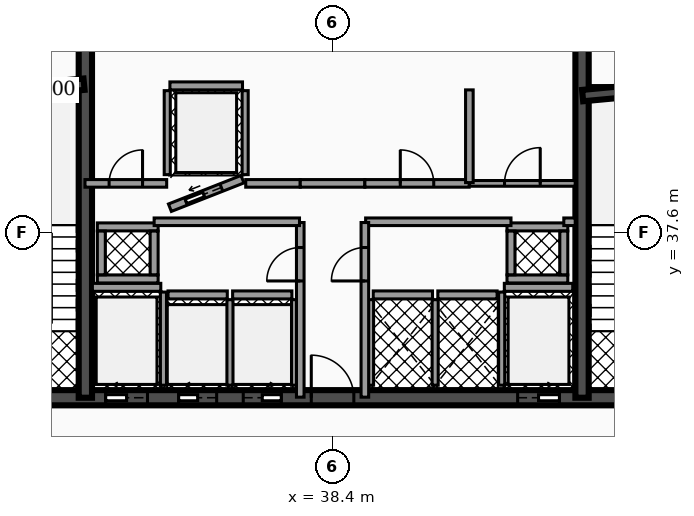
"""IFC4 building model, lengths in metres.
Left out: names, types, materials, properties, quantities, classifications, styles, units other than length and angle.
Written with IfcOpenShell. Run it as: python <this file> out.ifc"""

import sys

from ifc_helpers import new_model, si_unit, direction, frame, frame_2d, origin, place, context, subcontext, project, spatial, rectangle, extrude, element, fill, save


model = new_model("IFC4")
c1 = context("Model", 3, precision=1e-05, world=origin(), true_north=direction((0.0, 1.0)))
c2 = subcontext(c1, "Body", "Model", "MODEL_VIEW")
j1 = project(units=[si_unit("LENGTHUNIT", "METRE"), si_unit("PLANEANGLEUNIT", "RADIAN")], contexts=[c1])
p1 = place(None, origin())
s1 = spatial("IfcSite", under=j1, at=p1, CompositionType="ELEMENT")
p2 = place(p1, origin())
s2 = spatial("IfcBuilding", under=s1, at=p2, CompositionType="ELEMENT")
p3 = place(p2, frame((0.0, 0.0, 138.38)))
s3 = spatial("IfcBuildingStorey", under=s2, at=p3, CompositionType="ELEMENT", Elevation=138.38)
p4 = place(p3, frame((28.4, 33.25, 0.0), z_axis=(0.0, 0.0, 1.0), x_axis=(1.0, 0.0, 0.0)))
e1 = element("IfcWall", 1, at=p4, inside=s3, PredefinedType="SHEAR", context=c2, shape_type="SweptSolid", body=[
    extrude(rectangle(XDim=20.06, YDim=0.4, at=frame_2d((10.03, 0.0))), origin(), (0.0, 0.0, 1.0), 3.5),
])
p5 = place(p4, frame((4.03, 0.0, 0.0)))
e2 = element("IfcOpeningElement", 2, at=p5, cuts=e1, PredefinedType="OPENING", context=c2, shape_type="SweptSolid", body=[
    extrude(rectangle(XDim=1.1, YDim=2.15, at=frame_2d((0.55, 1.075))), frame((0.0, 0.21, 0.0), z_axis=(0.0, -1.0, 0.0), x_axis=(1.0, 0.0, 0.0)), (0.0, 0.0, 1.0), 0.42),
])
p6 = place(p4, frame((14.87, 0.0, 0.0)))
e3 = element("IfcOpeningElement", 3, at=p6, cuts=e1, PredefinedType="OPENING", context=c2, shape_type="SweptSolid", body=[
    extrude(rectangle(XDim=1.1, YDim=2.15, at=frame_2d((0.55, 1.075))), frame((0.0, 0.21, 0.0), z_axis=(0.0, -1.0, 0.0), x_axis=(1.0, 0.0, 0.0)), (0.0, 0.0, 1.0), 0.42),
])
p7 = place(p4, frame((5.95, 0.0, 0.0)))
e4 = element("IfcOpeningElement", 4, at=p7, cuts=e1, PredefinedType="OPENING", context=c2, shape_type="SweptSolid", body=[
    extrude(rectangle(XDim=1.0, YDim=2.1, at=frame_2d((0.5, 1.05))), frame((0.0, 0.21, 0.0), z_axis=(0.0, -1.0, 0.0), x_axis=(1.0, 0.0, 0.0)), (0.0, 0.0, 1.0), 0.42),
])
p8 = place(p4, frame((7.65, 0.0, 0.0)))
e5 = element("IfcOpeningElement", 5, at=p8, cuts=e1, PredefinedType="OPENING", context=c2, shape_type="SweptSolid", body=[
    extrude(rectangle(XDim=1.0, YDim=2.1, at=frame_2d((0.5, 1.05))), frame((0.0, 0.21, 0.0), z_axis=(0.0, -1.0, 0.0), x_axis=(1.0, 0.0, 0.0)), (0.0, 0.0, 1.0), 0.42),
])
p9 = place(p4, frame((1.31, 0.0, 0.0)))
e6 = element("IfcOpeningElement", 6, at=p9, cuts=e1, PredefinedType="OPENING", context=c2, shape_type="SweptSolid", body=[
    extrude(rectangle(XDim=1.1, YDim=2.2, at=frame_2d((0.55, 1.1))), frame((0.0, 0.21, 0.0), z_axis=(0.0, -1.0, 0.0), x_axis=(1.0, 0.0, 0.0)), (0.0, 0.0, 1.0), 0.42),
])
p10 = place(p4, frame((9.44, 0.0, 0.0)))
e7 = element("IfcOpeningElement", 7, at=p10, cuts=e1, PredefinedType="OPENING", context=c2, shape_type="SweptSolid", body=[
    extrude(rectangle(XDim=1.12, YDim=2.05, at=frame_2d((0.56, 1.025))), frame((0.0, 0.21, 0.0), z_axis=(0.0, -1.0, 0.0), x_axis=(1.0, 0.0, 0.0)), (0.0, 0.0, 1.0), 0.42),
])
p11 = place(p4, frame((17.65, 0.0, 0.0)))
e8 = element("IfcOpeningElement", 8, at=p11, cuts=e1, PredefinedType="OPENING", context=c2, shape_type="SweptSolid", body=[
    extrude(rectangle(XDim=1.1, YDim=2.2, at=frame_2d((0.55, 1.1))), frame((0.0, 0.21, 0.0), z_axis=(0.0, -1.0, 0.0), x_axis=(1.0, 0.0, 0.0)), (0.0, 0.0, 1.0), 0.42),
])
for number, where, z_axis, x_axis in (
    (9, (31.895, 33.25, 0.0), (0.0, 0.0, 1.0), (0.0, 1.0, 0.0)),
    (10, (44.965, 33.25, 0.0), (0.0, 0.0, 1.0), (0.0, 1.0, 0.0)),
):
    element("IfcWall", number, at=place(p3, frame(where, z_axis=z_axis, x_axis=x_axis)), inside=s3, PredefinedType="SHEAR", context=c2, shape_type="SweptSolid", body=[
        extrude(rectangle(XDim=10.2, YDim=0.35, at=frame_2d((5.1, 0.0))), origin(), (0.0, 0.0, 1.0), 3.5),
    ])
p12 = place(p3, frame((28.64, 41.2, 0.0), z_axis=(0.0, 0.0, 1.0), x_axis=(0.995687118776, 0.092774789157, 0.0)))
e11 = element("IfcWall", 11, at=p12, inside=s3, PredefinedType="SHEAR", context=c2, shape_type="SweptSolid", body=[
    extrude(rectangle(XDim=3.234, YDim=0.3, at=frame_2d((1.617, 0.0))), origin(), (0.0, 0.0, 1.0), 3.5),
])
p13 = place(p3, frame((44.98, 41.2, 0.0), z_axis=(0.0, 0.0, 1.0), x_axis=(0.995686468965, 0.09278176286, 0.0)))
e12 = element("IfcWall", 12, at=p13, inside=s3, PredefinedType="SHEAR", context=c2, shape_type="SweptSolid", body=[
    extrude(rectangle(XDim=3.234, YDim=0.3, at=frame_2d((1.617, 0.0))), origin(), (0.0, 0.0, 1.0), 3.5),
])
p14 = place(p3, frame((32.08, 36.155, 0.0), z_axis=(0.0, 0.0, 1.0), x_axis=(1.0, 0.0, 0.0)))
e13 = element("IfcWall", 13, at=p14, inside=s3, PredefinedType="SOLIDWALL", context=c2, shape_type="SweptSolid", body=[
    extrude(rectangle(XDim=1.8, YDim=0.21, at=frame_2d((0.9, 0.0))), origin(), (0.0, 0.0, 1.0), 2.472),
])
p15 = place(p3, frame((33.95, 33.58, 0.0), z_axis=(0.0, 0.0, 1.0), x_axis=(0.0, 1.0, 0.0)))
e14 = element("IfcWall", 14, at=p15, inside=s3, PredefinedType="SOLIDWALL", context=c2, shape_type="SweptSolid", body=[
    extrude(rectangle(XDim=2.45, YDim=0.16, at=frame_2d((1.225, 0.0))), origin(), (0.0, 0.0, 1.0), 2.472),
])
p16 = place(p3, frame((42.92, 36.155, 0.0), z_axis=(0.0, 0.0, 1.0), x_axis=(1.0, 0.0, 0.0)))
e15 = element("IfcWall", 15, at=p16, inside=s3, PredefinedType="SOLIDWALL", context=c2, shape_type="SweptSolid", body=[
    extrude(rectangle(XDim=1.8, YDim=0.21, at=frame_2d((0.9, 0.0))), origin(), (0.0, 0.0, 1.0), 2.472),
])
p17 = place(p3, frame((42.85, 33.58, 0.0), z_axis=(0.0, 0.0, 1.0), x_axis=(0.0, 1.0, 0.0)))
e16 = element("IfcWall", 16, at=p17, inside=s3, PredefinedType="SOLIDWALL", context=c2, shape_type="SweptSolid", body=[
    extrude(rectangle(XDim=2.45, YDim=0.16, at=frame_2d((1.225, 0.0))), origin(), (0.0, 0.0, 1.0), 2.472),
])
p18 = place(p3, frame((34.07, 35.955, 0.0), z_axis=(0.0, 0.0, 1.0), x_axis=(1.0, 0.0, 0.0)))
e17 = element("IfcWall", 17, at=p18, inside=s3, PredefinedType="SOLIDWALL", context=c2, shape_type="SweptSolid", body=[
    extrude(rectangle(XDim=1.56, YDim=0.21, at=frame_2d((0.78, 0.0))), origin(), (0.0, 0.0, 1.0), 2.472),
])
p19 = place(p3, frame((35.7, 33.58, 0.0), z_axis=(0.0, 0.0, 1.0), x_axis=(0.0, 1.0, 0.0)))
e18 = element("IfcWall", 18, at=p19, inside=s3, PredefinedType="SOLIDWALL", context=c2, shape_type="SweptSolid", body=[
    extrude(rectangle(XDim=2.25, YDim=0.16, at=frame_2d((1.125, 0.0))), origin(), (0.0, 0.0, 1.0), 2.472),
])
p20 = place(p3, frame((35.77, 35.955, 0.0), z_axis=(0.0, 0.0, 1.0), x_axis=(1.0, 0.0, 0.0)))
e19 = element("IfcWall", 19, at=p20, inside=s3, PredefinedType="SOLIDWALL", context=c2, shape_type="SweptSolid", body=[
    extrude(rectangle(XDim=1.56, YDim=0.21, at=frame_2d((0.78, 0.0))), origin(), (0.0, 0.0, 1.0), 2.472),
])
p21 = place(p3, frame((37.4, 33.58, 0.0), z_axis=(0.0, 0.0, 1.0), x_axis=(0.0, 1.0, 0.0)))
e20 = element("IfcWall", 20, at=p21, inside=s3, PredefinedType="SOLIDWALL", context=c2, shape_type="SweptSolid", body=[
    extrude(rectangle(XDim=2.25, YDim=0.16, at=frame_2d((1.125, 0.0))), origin(), (0.0, 0.0, 1.0), 2.472),
])
p22 = place(p3, frame((34.12, 38.25, 0.0), z_axis=(0.0, 0.0, 1.0), x_axis=(0.930804993012, 0.36551616241, 0.0)))
e21 = element("IfcWall", 21, at=p22, inside=s3, PredefinedType="SOLIDWALL", context=c2, shape_type="SweptSolid", body=[
    extrude(rectangle(XDim=2.052, YDim=0.21, at=frame_2d((1.026, 0.0))), origin(), (0.0, 0.0, 1.0), 2.472),
])
p23 = place(p22, frame((0.455, 0.0, 0.0)))
e22 = element("IfcOpeningElement", 22, at=p23, cuts=e21, PredefinedType="OPENING", context=c2, shape_type="SweptSolid", body=[
    extrude(rectangle(XDim=1.0, YDim=2.1, at=frame_2d((0.5, 1.05))), frame((0.0, 0.115, 0.0), z_axis=(0.0, -1.0, 0.0), x_axis=(1.0, 0.0, 0.0)), (0.0, 0.0, 1.0), 0.23),
])
p24 = place(p3, frame((34.12, 41.455, 0.0), z_axis=(0.0, 0.0, 1.0), x_axis=(1.0, 0.0, 0.0)))
e23 = element("IfcWall", 23, at=p24, inside=s3, PredefinedType="SOLIDWALL", context=c2, shape_type="SweptSolid", body=[
    extrude(rectangle(XDim=1.91, YDim=0.21, at=frame_2d((0.955, 0.0))), origin(), (0.0, 0.0, 1.0), 2.472),
])
for number, where, z_axis, x_axis in (
    (24, (34.05, 39.12, 0.0), (0.0, 0.0, 1.0), (0.0, 1.0, 0.0)),
    (25, (36.1, 39.12, 0.0), (0.0, 0.0, 1.0), (0.0, 1.0, 0.0)),
):
    element("IfcWall", number, at=place(p3, frame(where, z_axis=z_axis, x_axis=x_axis)), inside=s3, PredefinedType="SOLIDWALL", context=c2, shape_type="SweptSolid", body=[
        extrude(rectangle(XDim=2.21, YDim=0.16, at=frame_2d((1.105, 0.0))), origin(), (0.0, 0.0, 1.0), 2.472),
    ])
p25 = place(p3, frame((39.47, 35.955, 0.0), z_axis=(0.0, 0.0, 1.0), x_axis=(1.0, 0.0, 0.0)))
e26 = element("IfcWall", 26, at=p25, inside=s3, PredefinedType="SOLIDWALL", context=c2, shape_type="SweptSolid", body=[
    extrude(rectangle(XDim=1.56, YDim=0.21, at=frame_2d((0.78, 0.0))), origin(), (0.0, 0.0, 1.0), 2.472),
])
for number, where, z_axis, x_axis in (
    (27, (39.4, 33.58, 0.0), (0.0, 0.0, 1.0), (0.0, 1.0, 0.0)),
    (28, (41.1, 33.58, 0.0), (0.0, 0.0, 1.0), (0.0, 1.0, 0.0)),
):
    element("IfcWall", number, at=place(p3, frame(where, z_axis=z_axis, x_axis=x_axis)), inside=s3, PredefinedType="SOLIDWALL", context=c2, shape_type="SweptSolid", body=[
        extrude(rectangle(XDim=2.25, YDim=0.16, at=frame_2d((1.125, 0.0))), origin(), (0.0, 0.0, 1.0), 2.472),
    ])
p26 = place(p3, frame((41.17, 35.955, 0.0), z_axis=(0.0, 0.0, 1.0), x_axis=(1.0, 0.0, 0.0)))
e29 = element("IfcWall", 29, at=p26, inside=s3, PredefinedType="SOLIDWALL", context=c2, shape_type="SweptSolid", body=[
    extrude(rectangle(XDim=1.56, YDim=0.21, at=frame_2d((0.78, 0.0))), origin(), (0.0, 0.0, 1.0), 2.472),
])
for number, where, z_axis, x_axis in (
    (30, (32.21, 36.375, 0.0), (0.0, 0.0, 1.0), (1.0, 0.0, 0.0)),
    (31, (32.21, 37.745, 0.0), (0.0, 0.0, 1.0), (1.0, 0.0, 0.0)),
):
    element("IfcWall", number, at=place(p3, frame(where, z_axis=z_axis, x_axis=x_axis)), inside=s3, PredefinedType="SOLIDWALL", context=c2, shape_type="SweptSolid", body=[
        extrude(rectangle(XDim=1.6, YDim=0.21, at=frame_2d((0.8, 0.0))), origin(), (0.0, 0.0, 1.0), 3.5),
    ])
for number, where, z_axis, x_axis in (
    (32, (32.315, 36.485, 0.0), (0.0, 0.0, 1.0), (0.0, 1.0, 0.0)),
    (33, (33.705, 36.485, 0.0), (0.0, 0.0, 1.0), (0.0, 1.0, 0.0)),
):
    element("IfcWall", number, at=place(p3, frame(where, z_axis=z_axis, x_axis=x_axis)), inside=s3, PredefinedType="SOLIDWALL", context=c2, shape_type="SweptSolid", body=[
        extrude(rectangle(XDim=1.15, YDim=0.21, at=frame_2d((0.575, 0.0))), origin(), (0.0, 0.0, 1.0), 3.5),
    ])
for number, where, z_axis, x_axis in (
    (34, (42.99, 36.375, 0.0), (0.0, 0.0, 1.0), (1.0, 0.0, 0.0)),
    (35, (42.99, 37.745, 0.0), (0.0, 0.0, 1.0), (1.0, 0.0, 0.0)),
):
    element("IfcWall", number, at=place(p3, frame(where, z_axis=z_axis, x_axis=x_axis)), inside=s3, PredefinedType="SOLIDWALL", context=c2, shape_type="SweptSolid", body=[
        extrude(rectangle(XDim=1.6, YDim=0.21, at=frame_2d((0.8, 0.0))), origin(), (0.0, 0.0, 1.0), 3.5),
    ])
for number, where, z_axis, x_axis in (
    (36, (43.095, 36.485, 0.0), (0.0, 0.0, 1.0), (0.0, 1.0, 0.0)),
    (37, (44.485, 36.485, 0.0), (0.0, 0.0, 1.0), (0.0, 1.0, 0.0)),
):
    element("IfcWall", number, at=place(p3, frame(where, z_axis=z_axis, x_axis=x_axis)), inside=s3, PredefinedType="SOLIDWALL", context=c2, shape_type="SweptSolid", body=[
        extrude(rectangle(XDim=1.15, YDim=0.21, at=frame_2d((0.575, 0.0))), origin(), (0.0, 0.0, 1.0), 3.5),
    ])
p27 = place(p3, frame((37.55, 33.265, 0.0), z_axis=(0.0, 0.0, 1.0), x_axis=(0.0, 1.0, 0.0)))
e38 = element("IfcWall", 38, at=p27, inside=s3, PredefinedType="PARTITIONING", context=c2, shape_type="SweptSolid", body=[
    extrude(rectangle(XDim=4.595, YDim=0.2, at=frame_2d((2.298, 0.0))), origin(), (0.0, 0.0, 1.0), 2.457),
])
p28 = place(p27, frame((3.058, 0.0, 0.0)))
e39 = element("IfcOpeningElement", 39, at=p28, cuts=e38, PredefinedType="OPENING", context=c2, shape_type="SweptSolid", body=[
    extrude(rectangle(XDim=0.88, YDim=2.05, at=frame_2d((0.44, 1.025))), frame((0.0, 0.11, 0.0), z_axis=(0.0, -1.0, 0.0), x_axis=(1.0, 0.0, 0.0)), (0.0, 0.0, 1.0), 0.22),
])
p29 = place(p3, frame((33.705, 37.88, 0.0), z_axis=(0.0, 0.0, 1.0), x_axis=(1.0, 0.0, 0.0)))
e40 = element("IfcWall", 40, at=p29, inside=s3, PredefinedType="PARTITIONING", context=c2, shape_type="SweptSolid", body=[
    extrude(rectangle(XDim=3.825, YDim=0.2, at=frame_2d((1.913, 0.0))), origin(), (0.0, 0.0, 1.0), 2.457),
])
p30 = place(p3, frame((31.885, 38.89, 0.0), z_axis=(0.0, 0.0, 1.0), x_axis=(1.0, 0.0, 0.0)))
e41 = element("IfcWall", 41, at=p30, inside=s3, PredefinedType="PARTITIONING", context=c2, shape_type="SweptSolid", body=[
    extrude(rectangle(XDim=2.15, YDim=0.2, at=frame_2d((1.075, 0.0))), origin(), (0.0, 0.0, 1.0), 2.457),
])
p31 = place(p30, frame((0.635, 0.0, 0.0)))
e42 = element("IfcOpeningElement", 42, at=p31, cuts=e41, PredefinedType="OPENING", context=c2, shape_type="SweptSolid", body=[
    extrude(rectangle(XDim=0.88, YDim=2.05, at=frame_2d((0.44, 1.025))), frame((0.0, 0.11, 0.0), z_axis=(0.0, -1.0, 0.0), x_axis=(1.0, 0.0, 0.0)), (0.0, 0.0, 1.0), 0.22),
])
p32 = place(p3, frame((36.115, 38.89, 0.0), z_axis=(0.0, 0.0, 1.0), x_axis=(1.0, 0.0, 0.0)))
e43 = element("IfcWall", 43, at=p32, inside=s3, PredefinedType="PARTITIONING", context=c2, shape_type="SweptSolid", body=[
    extrude(rectangle(XDim=1.435, YDim=0.2, at=frame_2d((0.718, 0.0))), origin(), (0.0, 0.0, 1.0), 2.457),
])
p33 = place(p3, frame((37.55, 38.89, 0.0), z_axis=(0.0, 0.0, 1.0), x_axis=(1.0, 0.0, 0.0)))
e44 = element("IfcWall", 44, at=p33, inside=s3, PredefinedType="PARTITIONING", context=c2, shape_type="SweptSolid", body=[
    extrude(rectangle(XDim=1.7, YDim=0.2, at=frame_2d((0.85, 0.0))), origin(), (0.0, 0.0, 1.0), 2.457),
])
p34 = place(p3, frame((39.25, 38.89, 0.0), z_axis=(0.0, 0.0, 1.0), x_axis=(1.0, 0.0, 0.0)))
e45 = element("IfcWall", 45, at=p34, inside=s3, PredefinedType="PARTITIONING", context=c2, shape_type="SweptSolid", body=[
    extrude(rectangle(XDim=2.745, YDim=0.2, at=frame_2d((1.373, 0.0))), origin(), (0.0, 0.0, 1.0), 2.457),
])
p35 = place(p34, frame((0.933, 0.0, 0.0)))
e46 = element("IfcOpeningElement", 46, at=p35, cuts=e45, PredefinedType="OPENING", context=c2, shape_type="SweptSolid", body=[
    extrude(rectangle(XDim=0.88, YDim=2.05, at=frame_2d((0.44, 1.025))), frame((0.0, 0.11, 0.0), z_axis=(0.0, -1.0, 0.0), x_axis=(1.0, 0.0, 0.0)), (0.0, 0.0, 1.0), 0.22),
])
p36 = place(p3, frame((42.005, 38.89, 0.0), z_axis=(0.0, 0.0, 1.0), x_axis=(1.0, 0.0, 0.0)))
e47 = element("IfcWall", 47, at=p36, inside=s3, PredefinedType="PARTITIONING", context=c2, shape_type="SweptSolid", body=[
    extrude(rectangle(XDim=2.78, YDim=0.15, at=frame_2d((1.39, 0.0))), origin(), (0.0, 0.0, 1.0), 2.457),
])
p37 = place(p36, frame((0.92, 0.0, 0.0)))
e48 = element("IfcOpeningElement", 48, at=p37, cuts=e47, PredefinedType="OPENING", context=c2, shape_type="SweptSolid", body=[
    extrude(rectangle(XDim=0.94, YDim=2.05, at=frame_2d((0.47, 1.025))), frame((0.0, 0.085, 0.0), z_axis=(0.0, -1.0, 0.0), x_axis=(1.0, 0.0, 0.0)), (0.0, 0.0, 1.0), 0.17),
])
p38 = place(p3, frame((39.27, 37.88, 0.0), z_axis=(0.0, 0.0, 1.0), x_axis=(1.0, 0.0, 0.0)))
e49 = element("IfcWall", 49, at=p38, inside=s3, PredefinedType="PARTITIONING", context=c2, shape_type="SweptSolid", body=[
    extrude(rectangle(XDim=3.825, YDim=0.2, at=frame_2d((1.913, 0.0))), origin(), (0.0, 0.0, 1.0), 2.457),
])
p39 = place(p3, frame((44.485, 37.88, 0.0), z_axis=(0.0, 0.0, 1.0), x_axis=(1.0, 0.0, 0.0)))
e50 = element("IfcWall", 50, at=p39, inside=s3, PredefinedType="PARTITIONING", context=c2, shape_type="SweptSolid", body=[
    extrude(rectangle(XDim=0.3, YDim=0.2, at=frame_2d((0.15, 0.0))), origin(), (0.0, 0.0, 1.0), 2.457),
])
p40 = place(p3, frame((39.25, 33.265, 0.0), z_axis=(0.0, 0.0, 1.0), x_axis=(0.0, 1.0, 0.0)))
e51 = element("IfcWall", 51, at=p40, inside=s3, PredefinedType="PARTITIONING", context=c2, shape_type="SweptSolid", body=[
    extrude(rectangle(XDim=4.595, YDim=0.2, at=frame_2d((2.298, 0.0))), origin(), (0.0, 0.0, 1.0), 2.457),
])
p41 = place(p40, frame((3.058, 0.0, 0.0)))
e52 = element("IfcOpeningElement", 52, at=p41, cuts=e51, PredefinedType="OPENING", context=c2, shape_type="SweptSolid", body=[
    extrude(rectangle(XDim=0.88, YDim=2.05, at=frame_2d((0.44, 1.025))), frame((0.0, 0.11, 0.0), z_axis=(0.0, -1.0, 0.0), x_axis=(1.0, 0.0, 0.0)), (0.0, 0.0, 1.0), 0.22),
])
p42 = place(p3, frame((42.0, 38.91, 0.0), z_axis=(0.0, 0.0, 1.0), x_axis=(0.0, 1.0, 0.0)))
e53 = element("IfcWall", 53, at=p42, inside=s3, PredefinedType="PARTITIONING", context=c2, shape_type="SweptSolid", body=[
    extrude(rectangle(XDim=2.44, YDim=0.2, at=frame_2d((1.22, 0.0))), origin(), (0.0, 0.0, 1.0), 2.457),
])
p43 = place(p5, origin())
e54 = element("IfcDoor", 54, at=p43, inside=s3, OperationType="SLIDING_TO_LEFT", PredefinedType="DOOR", context=c2, shape_type="SweptSolid", body=[
    extrude(rectangle(XDim=1.1, YDim=2.15, at=frame_2d((0.55, 1.075))), frame((0.0, 0.025, 0.0), z_axis=(0.0, -1.0, 0.0), x_axis=(1.0, 0.0, 0.0)), (0.0, 0.0, 1.0), 0.05),
])
fill(e2, e54)
p44 = place(p6, origin())
e55 = element("IfcDoor", 55, at=p44, inside=s3, OperationType="SLIDING_TO_RIGHT", PredefinedType="DOOR", context=c2, shape_type="SweptSolid", body=[
    extrude(rectangle(XDim=1.1, YDim=2.15, at=frame_2d((0.55, 1.075))), frame((0.0, 0.025, 0.0), z_axis=(0.0, -1.0, 0.0), x_axis=(1.0, 0.0, 0.0)), (0.0, 0.0, 1.0), 0.05),
])
fill(e3, e55)
p45 = place(p7, origin())
e56 = element("IfcDoor", 56, at=p45, inside=s3, OperationType="SLIDING_TO_LEFT", PredefinedType="DOOR", context=c2, shape_type="SweptSolid", body=[
    extrude(rectangle(XDim=1.0, YDim=2.1, at=frame_2d((0.5, 1.05))), frame((0.0, 0.025, 0.0), z_axis=(0.0, -1.0, 0.0), x_axis=(1.0, 0.0, 0.0)), (0.0, 0.0, 1.0), 0.05),
])
fill(e4, e56)
p46 = place(p8, origin())
e57 = element("IfcDoor", 57, at=p46, inside=s3, OperationType="SLIDING_TO_RIGHT", PredefinedType="DOOR", context=c2, shape_type="SweptSolid", body=[
    extrude(rectangle(XDim=1.0, YDim=2.1, at=frame_2d((0.5, 1.05))), frame((0.0, 0.025, 0.0), z_axis=(0.0, -1.0, 0.0), x_axis=(1.0, 0.0, 0.0)), (0.0, 0.0, 1.0), 0.05),
])
fill(e5, e57)
p47 = place(p23, origin())
e58 = element("IfcDoor", 58, at=p47, inside=s3, OperationType="SLIDING_TO_LEFT", PredefinedType="DOOR", context=c2, shape_type="SweptSolid", body=[
    extrude(rectangle(XDim=1.0, YDim=2.1, at=frame_2d((0.5, 1.05))), frame((0.0, 0.025, 0.0), z_axis=(0.0, -1.0, 0.0), x_axis=(1.0, 0.0, 0.0)), (0.0, 0.0, 1.0), 0.05),
])
fill(e22, e58)
p48 = place(p10, origin())
e59 = element("IfcDoor", 59, at=p48, inside=s3, OperationType="SINGLE_SWING_LEFT", PredefinedType="DOOR", context=c2, shape_type="SweptSolid", body=[
    extrude(rectangle(XDim=1.12, YDim=2.05, at=frame_2d((0.56, 1.025))), frame((0.0, 0.025, 0.0), z_axis=(0.0, -1.0, 0.0), x_axis=(1.0, 0.0, 0.0)), (0.0, 0.0, 1.0), 0.05),
])
fill(e7, e59)
p49 = place(p28, origin())
e60 = element("IfcDoor", 60, at=p49, inside=s3, OperationType="SINGLE_SWING_LEFT", PredefinedType="DOOR", context=c2, shape_type="SweptSolid", body=[
    extrude(rectangle(XDim=0.88, YDim=2.05, at=frame_2d((0.44, 1.025))), frame((0.0, 0.025, 0.0), z_axis=(0.0, -1.0, 0.0), x_axis=(1.0, 0.0, 0.0)), (0.0, 0.0, 1.0), 0.05),
])
fill(e39, e60)
p50 = place(p31, origin())
e61 = element("IfcDoor", 61, at=p50, inside=s3, OperationType="SINGLE_SWING_RIGHT", PredefinedType="DOOR", context=c2, shape_type="SweptSolid", body=[
    extrude(rectangle(XDim=0.88, YDim=2.05, at=frame_2d((0.44, 1.025))), frame((0.0, 0.025, 0.0), z_axis=(0.0, -1.0, 0.0), x_axis=(1.0, 0.0, 0.0)), (0.0, 0.0, 1.0), 0.05),
])
fill(e42, e61)
p51 = place(p35, origin())
e62 = element("IfcDoor", 62, at=p51, inside=s3, OperationType="SINGLE_SWING_LEFT", PredefinedType="DOOR", context=c2, shape_type="SweptSolid", body=[
    extrude(rectangle(XDim=0.88, YDim=2.05, at=frame_2d((0.44, 1.025))), frame((0.0, 0.025, 0.0), z_axis=(0.0, -1.0, 0.0), x_axis=(1.0, 0.0, 0.0)), (0.0, 0.0, 1.0), 0.05),
])
fill(e46, e62)
p52 = place(p37, origin())
e63 = element("IfcDoor", 63, at=p52, inside=s3, OperationType="SINGLE_SWING_RIGHT", PredefinedType="DOOR", context=c2, shape_type="SweptSolid", body=[
    extrude(rectangle(XDim=0.94, YDim=2.05, at=frame_2d((0.47, 1.025))), frame((0.0, 0.025, 0.0), z_axis=(0.0, -1.0, 0.0), x_axis=(1.0, 0.0, 0.0)), (0.0, 0.0, 1.0), 0.05),
])
fill(e48, e63)
p53 = place(p41, origin())
e64 = element("IfcDoor", 64, at=p53, inside=s3, OperationType="SINGLE_SWING_LEFT", PredefinedType="DOOR", context=c2, shape_type="SweptSolid", body=[
    extrude(rectangle(XDim=0.88, YDim=2.05, at=frame_2d((0.44, 1.025))), frame((0.0, 0.025, 0.0), z_axis=(0.0, -1.0, 0.0), x_axis=(1.0, 0.0, 0.0)), (0.0, 0.0, 1.0), 0.05),
])
fill(e52, e64)
save(model, sys.argv[1])
